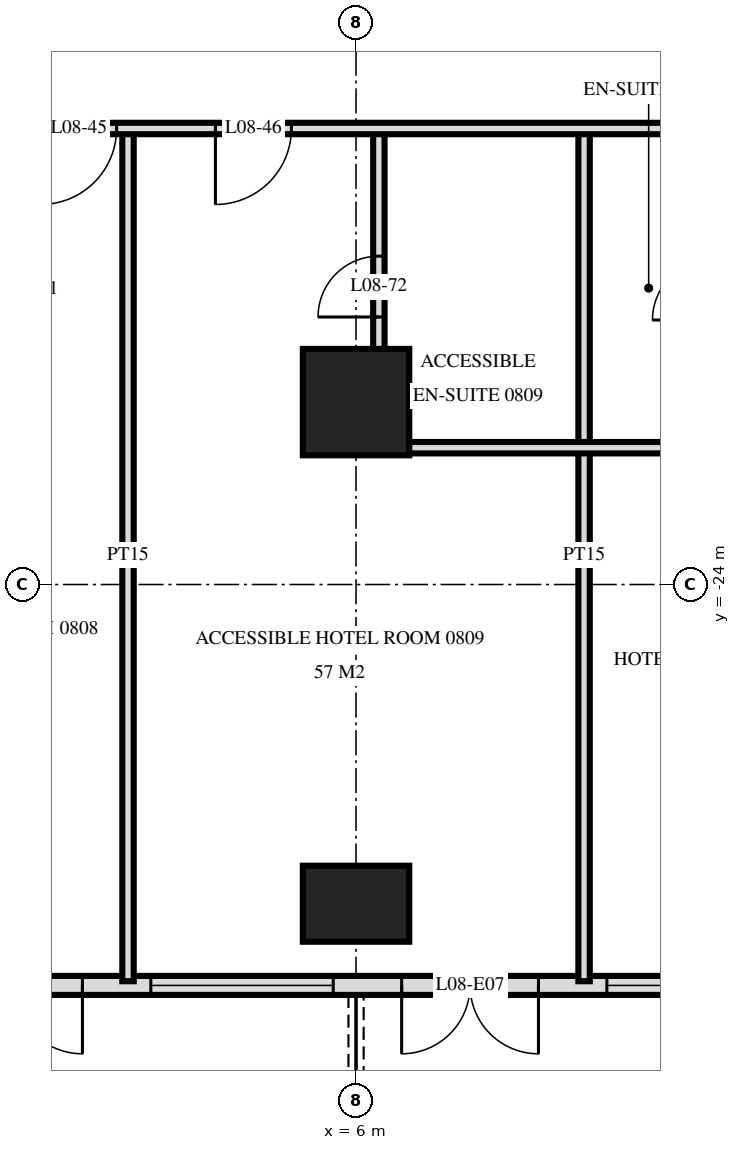
"""IFC4 building model, lengths in metres.
Left out: names, types, materials, properties, quantities, classifications, styles, units other than length and angle.
Written with IfcOpenShell. Run it as: python <this file> out.ifc"""

import sys

from ifc_helpers import new_model, si_unit, direction, frame, frame_2d, origin, origin_2d, place, context, subcontext, project, spatial, rectangle, extrude, element, fill, save


model = new_model("IFC4")
c1 = context("Model", 3, precision=1e-05, world=origin(), true_north=direction((0.0, 1.0)))
c2 = subcontext(c1, "Body", "Model", "MODEL_VIEW")
j1 = project(units=[si_unit("LENGTHUNIT", "METRE"), si_unit("PLANEANGLEUNIT", "RADIAN")], contexts=[c1])
p1 = place(None, origin())
s1 = spatial("IfcSite", under=j1, at=p1, CompositionType="ELEMENT")
p2 = place(p1, origin())
s2 = spatial("IfcBuilding", under=s1, at=p2, CompositionType="ELEMENT")
p3 = place(p2, frame((0.0, 0.0, 38.4)))
s3 = spatial("IfcBuildingStorey", under=s2, at=p3, CompositionType="ELEMENT", Elevation=38.4)
p4 = place(p3, frame((6.0, -28.2, 0.0), z_axis=(0.0, 0.0, 1.0), x_axis=(1.0, 0.0, 0.0)))
e1 = element("IfcColumn", 1, at=p4, inside=s3, PredefinedType="COLUMN", context=c2, shape_type="SweptSolid", body=[
    extrude(rectangle(XDim=1.4, YDim=1.0, at=origin_2d()), origin(), (0.0, 0.0, 1.0), 3.6),
])
p5 = place(p3, frame((6.0, -21.6, 0.0), z_axis=(0.0, 0.0, 1.0), x_axis=(1.0, 0.0, 0.0)))
e2 = element("IfcColumn", 2, at=p5, inside=s3, PredefinedType="COLUMN", context=c2, shape_type="SweptSolid", body=[
    extrude(rectangle(XDim=1.4, YDim=1.4, at=origin_2d()), origin(), (0.0, 0.0, 1.0), 3.6),
])
p6 = place(p3, frame((-28.775, -29.275, 0.0), z_axis=(0.0, 0.0, 1.0), x_axis=(1.0, 0.0, 0.0)))
e3 = element("IfcWall", 3, at=p6, inside=s3, PredefinedType="SOLIDWALL", context=c2, shape_type="SweptSolid", body=[
    extrude(rectangle(XDim=57.551, YDim=0.25, at=frame_2d((28.775, 0.0))), origin(), (0.0, 0.0, 1.0), 3.32),
])
p7 = place(p6, frame((0.575, 0.0, 0.0)))
e4 = element("IfcOpeningElement", 4, at=p7, cuts=e3, PredefinedType="OPENING", context=c2, shape_type="SweptSolid", body=[
    extrude(rectangle(XDim=1.8, YDim=2.4, at=frame_2d((0.9, 1.2))), frame((0.0, 0.135, 0.0), z_axis=(0.0, -1.0, 0.0), x_axis=(1.0, 0.0, 0.0)), (0.0, 0.0, 1.0), 0.27),
])
p8 = place(p6, frame((5.375, 0.0, 0.0)))
e5 = element("IfcOpeningElement", 5, at=p8, cuts=e3, PredefinedType="OPENING", context=c2, shape_type="SweptSolid", body=[
    extrude(rectangle(XDim=1.8, YDim=2.4, at=frame_2d((0.9, 1.2))), frame((0.0, 0.135, 0.0), z_axis=(0.0, -1.0, 0.0), x_axis=(1.0, 0.0, 0.0)), (0.0, 0.0, 1.0), 0.27),
])
p9 = place(p6, frame((8.075, 0.0, 0.3)))
e6 = element("IfcOpeningElement", 6, at=p9, cuts=e3, PredefinedType="OPENING", context=c2, shape_type="SweptSolid", body=[
    extrude(rectangle(XDim=2.4, YDim=2.1, at=frame_2d((1.2, 1.05))), frame((0.0, 0.135, 0.0), z_axis=(0.0, -1.0, 0.0), x_axis=(1.0, 0.0, 0.0)), (0.0, 0.0, 1.0), 0.27),
])
p10 = place(p6, frame((11.375, 0.0, 0.0)))
e7 = element("IfcOpeningElement", 7, at=p10, cuts=e3, PredefinedType="OPENING", context=c2, shape_type="SweptSolid", body=[
    extrude(rectangle(XDim=1.8, YDim=2.4, at=frame_2d((0.9, 1.2))), frame((0.0, 0.135, 0.0), z_axis=(0.0, -1.0, 0.0), x_axis=(1.0, 0.0, 0.0)), (0.0, 0.0, 1.0), 0.27),
])
p11 = place(p6, frame((14.075, 0.0, 0.3)))
e8 = element("IfcOpeningElement", 8, at=p11, cuts=e3, PredefinedType="OPENING", context=c2, shape_type="SweptSolid", body=[
    extrude(rectangle(XDim=2.4, YDim=2.1, at=frame_2d((1.2, 1.05))), frame((0.0, 0.135, 0.0), z_axis=(0.0, -1.0, 0.0), x_axis=(1.0, 0.0, 0.0)), (0.0, 0.0, 1.0), 0.27),
])
p12 = place(p6, frame((17.375, 0.0, 0.0)))
e9 = element("IfcOpeningElement", 9, at=p12, cuts=e3, PredefinedType="OPENING", context=c2, shape_type="SweptSolid", body=[
    extrude(rectangle(XDim=1.8, YDim=2.4, at=frame_2d((0.9, 1.2))), frame((0.0, 0.135, 0.0), z_axis=(0.0, -1.0, 0.0), x_axis=(1.0, 0.0, 0.0)), (0.0, 0.0, 1.0), 0.27),
])
p13 = place(p6, frame((20.075, 0.0, 0.3)))
e10 = element("IfcOpeningElement", 10, at=p13, cuts=e3, PredefinedType="OPENING", context=c2, shape_type="SweptSolid", body=[
    extrude(rectangle(XDim=2.4, YDim=2.1, at=frame_2d((1.2, 1.05))), frame((0.0, 0.135, 0.0), z_axis=(0.0, -1.0, 0.0), x_axis=(1.0, 0.0, 0.0)), (0.0, 0.0, 1.0), 0.27),
])
p14 = place(p6, frame((23.075, 0.0, 0.3)))
e11 = element("IfcOpeningElement", 11, at=p14, cuts=e3, PredefinedType="OPENING", context=c2, shape_type="SweptSolid", body=[
    extrude(rectangle(XDim=2.4, YDim=2.1, at=frame_2d((1.2, 1.05))), frame((0.0, 0.135, 0.0), z_axis=(0.0, -1.0, 0.0), x_axis=(1.0, 0.0, 0.0)), (0.0, 0.0, 1.0), 0.27),
])
p15 = place(p6, frame((26.375, 0.0, 0.0)))
e12 = element("IfcOpeningElement", 12, at=p15, cuts=e3, PredefinedType="OPENING", context=c2, shape_type="SweptSolid", body=[
    extrude(rectangle(XDim=1.8, YDim=2.4, at=frame_2d((0.9, 1.2))), frame((0.0, 0.135, 0.0), z_axis=(0.0, -1.0, 0.0), x_axis=(1.0, 0.0, 0.0)), (0.0, 0.0, 1.0), 0.27),
])
p16 = place(p6, frame((29.375, 0.0, 0.0)))
e13 = element("IfcOpeningElement", 13, at=p16, cuts=e3, PredefinedType="OPENING", context=c2, shape_type="SweptSolid", body=[
    extrude(rectangle(XDim=1.8, YDim=2.4, at=frame_2d((0.9, 1.2))), frame((0.0, 0.135, 0.0), z_axis=(0.0, -1.0, 0.0), x_axis=(1.0, 0.0, 0.0)), (0.0, 0.0, 1.0), 0.27),
])
p17 = place(p6, frame((32.075, 0.0, 0.3)))
e14 = element("IfcOpeningElement", 14, at=p17, cuts=e3, PredefinedType="OPENING", context=c2, shape_type="SweptSolid", body=[
    extrude(rectangle(XDim=2.4, YDim=2.1, at=frame_2d((1.2, 1.05))), frame((0.0, 0.135, 0.0), z_axis=(0.0, -1.0, 0.0), x_axis=(1.0, 0.0, 0.0)), (0.0, 0.0, 1.0), 0.27),
])
p18 = place(p6, frame((35.375, 0.0, 0.0)))
e15 = element("IfcOpeningElement", 15, at=p18, cuts=e3, PredefinedType="OPENING", context=c2, shape_type="SweptSolid", body=[
    extrude(rectangle(XDim=1.8, YDim=2.4, at=frame_2d((0.9, 1.2))), frame((0.0, 0.135, 0.0), z_axis=(0.0, -1.0, 0.0), x_axis=(1.0, 0.0, 0.0)), (0.0, 0.0, 1.0), 0.27),
])
p19 = place(p6, frame((38.075, 0.0, 0.3)))
e16 = element("IfcOpeningElement", 16, at=p19, cuts=e3, PredefinedType="OPENING", context=c2, shape_type="SweptSolid", body=[
    extrude(rectangle(XDim=2.4, YDim=2.1, at=frame_2d((1.2, 1.05))), frame((0.0, 0.135, 0.0), z_axis=(0.0, -1.0, 0.0), x_axis=(1.0, 0.0, 0.0)), (0.0, 0.0, 1.0), 0.27),
])
p20 = place(p6, frame((41.375, 0.0, 0.0)))
e17 = element("IfcOpeningElement", 17, at=p20, cuts=e3, PredefinedType="OPENING", context=c2, shape_type="SweptSolid", body=[
    extrude(rectangle(XDim=1.8, YDim=2.4, at=frame_2d((0.9, 1.2))), frame((0.0, 0.135, 0.0), z_axis=(0.0, -1.0, 0.0), x_axis=(1.0, 0.0, 0.0)), (0.0, 0.0, 1.0), 0.27),
])
p21 = place(p6, frame((44.075, 0.0, 0.3)))
e18 = element("IfcOpeningElement", 18, at=p21, cuts=e3, PredefinedType="OPENING", context=c2, shape_type="SweptSolid", body=[
    extrude(rectangle(XDim=2.4, YDim=2.1, at=frame_2d((1.2, 1.05))), frame((0.0, 0.135, 0.0), z_axis=(0.0, -1.0, 0.0), x_axis=(1.0, 0.0, 0.0)), (0.0, 0.0, 1.0), 0.27),
])
p22 = place(p6, frame((47.375, 0.0, 0.0)))
e19 = element("IfcOpeningElement", 19, at=p22, cuts=e3, PredefinedType="OPENING", context=c2, shape_type="SweptSolid", body=[
    extrude(rectangle(XDim=1.8, YDim=2.4, at=frame_2d((0.9, 1.2))), frame((0.0, 0.135, 0.0), z_axis=(0.0, -1.0, 0.0), x_axis=(1.0, 0.0, 0.0)), (0.0, 0.0, 1.0), 0.27),
])
p23 = place(p6, frame((50.075, 0.0, 0.3)))
e20 = element("IfcOpeningElement", 20, at=p23, cuts=e3, PredefinedType="OPENING", context=c2, shape_type="SweptSolid", body=[
    extrude(rectangle(XDim=2.4, YDim=2.1, at=frame_2d((1.2, 1.05))), frame((0.0, 0.135, 0.0), z_axis=(0.0, -1.0, 0.0), x_axis=(1.0, 0.0, 0.0)), (0.0, 0.0, 1.0), 0.27),
])
p24 = place(p6, frame((53.375, 0.0, 0.0)))
e21 = element("IfcOpeningElement", 21, at=p24, cuts=e3, PredefinedType="OPENING", context=c2, shape_type="SweptSolid", body=[
    extrude(rectangle(XDim=1.8, YDim=2.4, at=frame_2d((0.9, 1.2))), frame((0.0, 0.135, 0.0), z_axis=(0.0, -1.0, 0.0), x_axis=(1.0, 0.0, 0.0)), (0.0, 0.0, 1.0), 0.27),
])
p25 = place(p3, frame((9.0, -29.22, 0.0), z_axis=(0.0, 0.0, 1.0), x_axis=(0.0, 1.0, 0.0)))
e22 = element("IfcWall", 22, at=p25, inside=s3, PredefinedType="PARTITIONING", context=c2, shape_type="SweptSolid", body=[
    extrude(rectangle(XDim=11.22, YDim=0.15, at=frame_2d((5.61, 0.0))), origin(), (0.0, 0.0, 1.0), 3.32),
])
p26 = place(p3, frame((6.3, -22.2, 0.0), z_axis=(0.0, 0.0, 1.0), x_axis=(0.0, 1.0, 0.0)))
e23 = element("IfcWall", 23, at=p26, inside=s3, PredefinedType="PARTITIONING", context=c2, shape_type="SweptSolid", body=[
    extrude(rectangle(XDim=4.2, YDim=0.15, at=frame_2d((2.1, 0.0))), origin(), (0.0, 0.0, 1.0), 3.32),
])
p27 = place(p26, frame((1.72, 0.0, 0.0)))
e24 = element("IfcOpeningElement", 24, at=p27, cuts=e23, PredefinedType="OPENING", context=c2, shape_type="SweptSolid", body=[
    extrude(rectangle(XDim=0.8, YDim=2.1, at=frame_2d((0.4, 1.05))), frame((0.0, 0.085, 0.0), z_axis=(0.0, -1.0, 0.0), x_axis=(1.0, 0.0, 0.0)), (0.0, 0.0, 1.0), 0.17),
])
p28 = place(p3, frame((3.0, -29.22, 0.0), z_axis=(0.0, 0.0, 1.0), x_axis=(0.0, 1.0, 0.0)))
e25 = element("IfcWall", 25, at=p28, inside=s3, PredefinedType="PARTITIONING", context=c2, shape_type="SweptSolid", body=[
    extrude(rectangle(XDim=11.22, YDim=0.15, at=frame_2d((5.61, 0.0))), origin(), (0.0, 0.0, 1.0), 3.32),
])
p29 = place(p3, frame((6.3, -22.2, 0.0), z_axis=(0.0, 0.0, 1.0), x_axis=(1.0, 0.0, 0.0)))
e26 = element("IfcWall", 26, at=p29, inside=s3, PredefinedType="PARTITIONING", context=c2, shape_type="SweptSolid", body=[
    extrude(rectangle(XDim=4.4, YDim=0.15, at=frame_2d((2.2, 0.0))), origin(), (0.0, 0.0, 1.0), 3.32),
])
p30 = place(p3, frame((-33.12, -18.0, 0.0), z_axis=(0.0, 0.0, 1.0), x_axis=(1.0, 0.0, 0.0)))
e27 = element("IfcWall", 27, at=p30, inside=s3, PredefinedType="PARTITIONING", context=c2, shape_type="SweptSolid", body=[
    extrude(rectangle(XDim=66.24, YDim=0.15, at=frame_2d((33.12, 0.0))), origin(), (0.0, 0.0, 1.0), 3.32),
])
p31 = place(p30, frame((12.27, 0.0, 0.0)))
e28 = element("IfcOpeningElement", 28, at=p31, cuts=e27, PredefinedType="OPENING", context=c2, shape_type="SweptSolid", body=[
    extrude(rectangle(XDim=1.0, YDim=2.1, at=frame_2d((0.5, 1.05))), frame((0.0, 0.085, 0.0), z_axis=(0.0, -1.0, 0.0), x_axis=(1.0, 0.0, 0.0)), (0.0, 0.0, 1.0), 0.17),
])
p32 = place(p30, frame((16.97, 0.0, 0.0)))
e29 = element("IfcOpeningElement", 29, at=p32, cuts=e27, PredefinedType="OPENING", context=c2, shape_type="SweptSolid", body=[
    extrude(rectangle(XDim=1.0, YDim=2.1, at=frame_2d((0.5, 1.05))), frame((0.0, 0.085, 0.0), z_axis=(0.0, -1.0, 0.0), x_axis=(1.0, 0.0, 0.0)), (0.0, 0.0, 1.0), 0.17),
])
p33 = place(p30, frame((18.27, 0.0, 0.0)))
e30 = element("IfcOpeningElement", 30, at=p33, cuts=e27, PredefinedType="OPENING", context=c2, shape_type="SweptSolid", body=[
    extrude(rectangle(XDim=1.0, YDim=2.1, at=frame_2d((0.5, 1.05))), frame((0.0, 0.085, 0.0), z_axis=(0.0, -1.0, 0.0), x_axis=(1.0, 0.0, 0.0)), (0.0, 0.0, 1.0), 0.17),
])
p34 = place(p30, frame((22.97, 0.0, 0.0)))
e31 = element("IfcOpeningElement", 31, at=p34, cuts=e27, PredefinedType="OPENING", context=c2, shape_type="SweptSolid", body=[
    extrude(rectangle(XDim=1.0, YDim=2.1, at=frame_2d((0.5, 1.05))), frame((0.0, 0.085, 0.0), z_axis=(0.0, -1.0, 0.0), x_axis=(1.0, 0.0, 0.0)), (0.0, 0.0, 1.0), 0.17),
])
p35 = place(p30, frame((24.27, 0.0, 0.0)))
e32 = element("IfcOpeningElement", 32, at=p35, cuts=e27, PredefinedType="OPENING", context=c2, shape_type="SweptSolid", body=[
    extrude(rectangle(XDim=1.0, YDim=2.1, at=frame_2d((0.5, 1.05))), frame((0.0, 0.085, 0.0), z_axis=(0.0, -1.0, 0.0), x_axis=(1.0, 0.0, 0.0)), (0.0, 0.0, 1.0), 0.17),
])
p36 = place(p30, frame((28.97, 0.0, 0.0)))
e33 = element("IfcOpeningElement", 33, at=p36, cuts=e27, PredefinedType="OPENING", context=c2, shape_type="SweptSolid", body=[
    extrude(rectangle(XDim=1.0, YDim=2.1, at=frame_2d((0.5, 1.05))), frame((0.0, 0.085, 0.0), z_axis=(0.0, -1.0, 0.0), x_axis=(1.0, 0.0, 0.0)), (0.0, 0.0, 1.0), 0.17),
])
p37 = place(p30, frame((30.27, 0.0, 0.0)))
e34 = element("IfcOpeningElement", 34, at=p37, cuts=e27, PredefinedType="OPENING", context=c2, shape_type="SweptSolid", body=[
    extrude(rectangle(XDim=1.0, YDim=2.1, at=frame_2d((0.5, 1.05))), frame((0.0, 0.085, 0.0), z_axis=(0.0, -1.0, 0.0), x_axis=(1.0, 0.0, 0.0)), (0.0, 0.0, 1.0), 0.17),
])
p38 = place(p30, frame((34.97, 0.0, 0.0)))
e35 = element("IfcOpeningElement", 35, at=p38, cuts=e27, PredefinedType="OPENING", context=c2, shape_type="SweptSolid", body=[
    extrude(rectangle(XDim=1.0, YDim=2.1, at=frame_2d((0.5, 1.05))), frame((0.0, 0.085, 0.0), z_axis=(0.0, -1.0, 0.0), x_axis=(1.0, 0.0, 0.0)), (0.0, 0.0, 1.0), 0.17),
])
p39 = place(p30, frame((37.27, 0.0, 0.0)))
e36 = element("IfcOpeningElement", 36, at=p39, cuts=e27, PredefinedType="OPENING", context=c2, shape_type="SweptSolid", body=[
    extrude(rectangle(XDim=1.0, YDim=2.1, at=frame_2d((0.5, 1.05))), frame((0.0, 0.085, 0.0), z_axis=(0.0, -1.0, 0.0), x_axis=(1.0, 0.0, 0.0)), (0.0, 0.0, 1.0), 0.17),
])
p40 = place(p30, frame((43.97, 0.0, 0.0)))
e37 = element("IfcOpeningElement", 37, at=p40, cuts=e27, PredefinedType="OPENING", context=c2, shape_type="SweptSolid", body=[
    extrude(rectangle(XDim=1.0, YDim=2.1, at=frame_2d((0.5, 1.05))), frame((0.0, 0.085, 0.0), z_axis=(0.0, -1.0, 0.0), x_axis=(1.0, 0.0, 0.0)), (0.0, 0.0, 1.0), 0.17),
])
p41 = place(p30, frame((45.27, 0.0, 0.0)))
e38 = element("IfcOpeningElement", 38, at=p41, cuts=e27, PredefinedType="OPENING", context=c2, shape_type="SweptSolid", body=[
    extrude(rectangle(XDim=1.0, YDim=2.1, at=frame_2d((0.5, 1.05))), frame((0.0, 0.085, 0.0), z_axis=(0.0, -1.0, 0.0), x_axis=(1.0, 0.0, 0.0)), (0.0, 0.0, 1.0), 0.17),
])
p42 = place(p30, frame((51.22, 0.0, 0.0)))
e39 = element("IfcOpeningElement", 39, at=p42, cuts=e27, PredefinedType="OPENING", context=c2, shape_type="SweptSolid", body=[
    extrude(rectangle(XDim=1.0, YDim=2.1, at=frame_2d((0.5, 1.05))), frame((0.0, 0.085, 0.0), z_axis=(0.0, -1.0, 0.0), x_axis=(1.0, 0.0, 0.0)), (0.0, 0.0, 1.0), 0.17),
])
p43 = place(p30, frame((54.27, 0.0, 0.0)))
e40 = element("IfcOpeningElement", 40, at=p43, cuts=e27, PredefinedType="OPENING", context=c2, shape_type="SweptSolid", body=[
    extrude(rectangle(XDim=1.0, YDim=2.1, at=frame_2d((0.5, 1.05))), frame((0.0, 0.085, 0.0), z_axis=(0.0, -1.0, 0.0), x_axis=(1.0, 0.0, 0.0)), (0.0, 0.0, 1.0), 0.17),
])
p44 = place(p30, frame((6.07, 0.0, 0.0)))
e41 = element("IfcOpeningElement", 41, at=p44, cuts=e27, PredefinedType="OPENING", context=c2, shape_type="SweptSolid", body=[
    extrude(rectangle(XDim=1.0, YDim=2.1, at=frame_2d((0.5, 1.05))), frame((0.0, 0.085, 0.0), z_axis=(0.0, -1.0, 0.0), x_axis=(1.0, 0.0, 0.0)), (0.0, 0.0, 1.0), 0.17),
])
p45 = place(p30, frame((63.37, 0.0, 0.0)))
e42 = element("IfcOpeningElement", 42, at=p45, cuts=e27, PredefinedType="OPENING", context=c2, shape_type="SweptSolid", body=[
    extrude(rectangle(XDim=1.0, YDim=2.1, at=frame_2d((0.5, 1.05))), frame((0.0, 0.085, 0.0), z_axis=(0.0, -1.0, 0.0), x_axis=(1.0, 0.0, 0.0)), (0.0, 0.0, 1.0), 0.17),
])
p46 = place(p16, frame((0.9, 0.0, 0.0), z_axis=(0.0, 0.0, 1.0), x_axis=(-1.0, 0.0, 0.0)))
e43 = element("IfcDoor", 43, at=p46, inside=s3, OperationType="DOUBLE_DOOR_SINGLE_SWING", PredefinedType="DOOR", context=c2, shape_type="SweptSolid", body=[
    extrude(rectangle(XDim=1.8, YDim=2.4, at=frame_2d((0.0, 1.2))), frame((0.0, -0.025, 0.0), z_axis=(0.0, 1.0, 0.0), x_axis=(-1.0, 0.0, 0.0)), (0.0, 0.0, 1.0), 0.05),
])
fill(e13, e43)
p47 = place(p17, origin())
e44 = element("IfcWindow", 44, at=p47, inside=s3, PartitioningType="SINGLE_PANEL", PredefinedType="WINDOW", context=c2, shape_type="SweptSolid", body=[
    extrude(rectangle(XDim=2.4, YDim=2.1, at=frame_2d((1.2, 1.05))), frame((0.0, 0.03, 0.0), z_axis=(0.0, -1.0, 0.0), x_axis=(1.0, 0.0, 0.0)), (0.0, 0.0, 1.0), 0.06),
])
fill(e14, e44)
p48 = place(p18, frame((0.9, 0.0, 0.0), z_axis=(0.0, 0.0, 1.0), x_axis=(-1.0, 0.0, 0.0)))
e45 = element("IfcDoor", 45, at=p48, inside=s3, OperationType="DOUBLE_DOOR_SINGLE_SWING", PredefinedType="DOOR", context=c2, shape_type="SweptSolid", body=[
    extrude(rectangle(XDim=1.8, YDim=2.4, at=frame_2d((0.0, 1.2))), frame((0.0, -0.025, 0.0), z_axis=(0.0, 1.0, 0.0), x_axis=(-1.0, 0.0, 0.0)), (0.0, 0.0, 1.0), 0.05),
])
fill(e15, e45)
p49 = place(p19, origin())
e46 = element("IfcWindow", 46, at=p49, inside=s3, PartitioningType="SINGLE_PANEL", PredefinedType="WINDOW", context=c2, shape_type="SweptSolid", body=[
    extrude(rectangle(XDim=2.4, YDim=2.1, at=frame_2d((1.2, 1.05))), frame((0.0, 0.03, 0.0), z_axis=(0.0, -1.0, 0.0), x_axis=(1.0, 0.0, 0.0)), (0.0, 0.0, 1.0), 0.06),
])
fill(e16, e46)
p50 = place(p38, frame((0.5, 0.0, 0.0), z_axis=(0.0, 0.0, 1.0), x_axis=(-1.0, 0.0, 0.0)))
e47 = element("IfcDoor", 47, at=p50, inside=s3, OperationType="SINGLE_SWING_LEFT", PredefinedType="DOOR", context=c2, shape_type="SweptSolid", body=[
    extrude(rectangle(XDim=1.0, YDim=2.1, at=frame_2d((0.0, 1.05))), frame((0.0, -0.025, 0.0), z_axis=(0.0, 1.0, 0.0), x_axis=(-1.0, 0.0, 0.0)), (0.0, 0.0, 1.0), 0.05),
])
fill(e35, e47)
p51 = place(p39, frame((0.5, 0.0, 0.0), z_axis=(0.0, 0.0, 1.0), x_axis=(-1.0, 0.0, 0.0)))
e48 = element("IfcDoor", 48, at=p51, inside=s3, OperationType="SINGLE_SWING_LEFT", PredefinedType="DOOR", context=c2, shape_type="SweptSolid", body=[
    extrude(rectangle(XDim=1.0, YDim=2.1, at=frame_2d((0.0, 1.05))), frame((0.0, -0.025, 0.0), z_axis=(0.0, 1.0, 0.0), x_axis=(-1.0, 0.0, 0.0)), (0.0, 0.0, 1.0), 0.05),
])
fill(e36, e48)
p52 = place(p27, origin())
e49 = element("IfcDoor", 49, at=p52, inside=s3, OperationType="SINGLE_SWING_RIGHT", PredefinedType="DOOR", context=c2, shape_type="SweptSolid", body=[
    extrude(rectangle(XDim=0.8, YDim=2.1, at=frame_2d((0.4, 1.05))), frame((0.0, 0.025, 0.0), z_axis=(0.0, -1.0, 0.0), x_axis=(1.0, 0.0, 0.0)), (0.0, 0.0, 1.0), 0.05),
])
fill(e24, e49)
save(model, sys.argv[1])
